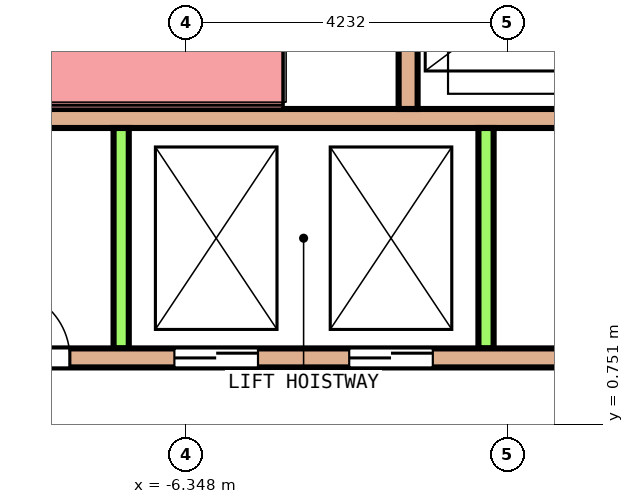
"""IFC4 building model, lengths in metres.
Left out: names, types, materials, properties, quantities, classifications, styles, units other than length and angle.
Written with IfcOpenShell. Run it as: python <this file> out.ifc"""

import sys

from ifc_helpers import new_model, si_unit, direction, frame, frame_2d, origin, place, context, subcontext, project, spatial, rectangle, extrude, element, fill, save


model = new_model("IFC4")
c1 = context("Model", 3, precision=1e-05, world=origin(), true_north=direction((0.0, 1.0)))
c2 = subcontext(c1, "Body", "Model", "MODEL_VIEW")
j1 = project(units=[si_unit("LENGTHUNIT", "METRE"), si_unit("PLANEANGLEUNIT", "RADIAN")], contexts=[c1])
p1 = place(None, origin())
s1 = spatial("IfcSite", under=j1, at=p1, CompositionType="ELEMENT")
p2 = place(p1, origin())
s2 = spatial("IfcBuilding", under=s1, at=p2, CompositionType="ELEMENT")
p3 = place(p2, frame((0.0, 0.0, 198.0)))
s3 = spatial("IfcBuildingStorey", under=s2, at=p3, CompositionType="ELEMENT", Elevation=198.0)
p4 = place(p3, frame((-9.35, 1.625, 0.0), z_axis=(0.0, 0.0, 1.0), x_axis=(1.0, 0.0, 0.0)))
e1 = element("IfcWall", 1, at=p4, inside=s3, PredefinedType="SOLIDWALL", context=c2, shape_type="SweptSolid", body=[
    extrude(rectangle(XDim=18.7, YDim=0.25, at=frame_2d((9.35, 0.0))), origin(), (0.0, 0.0, 1.0), 4.1),
])
p5 = place(p4, frame((2.85, 0.0, 0.0)))
e2 = element("IfcOpeningElement", 2, at=p5, cuts=e1, PredefinedType="OPENING", context=c2, shape_type="SweptSolid", body=[
    extrude(rectangle(XDim=1.1, YDim=2.1, at=frame_2d((0.55, 1.05))), frame((0.0, 0.135, 0.0), z_axis=(0.0, -1.0, 0.0), x_axis=(1.0, 0.0, 0.0)), (0.0, 0.0, 1.0), 0.27),
])
p6 = place(p4, frame((5.15, 0.0, 0.0)))
e3 = element("IfcOpeningElement", 3, at=p6, cuts=e1, PredefinedType="OPENING", context=c2, shape_type="SweptSolid", body=[
    extrude(rectangle(XDim=1.1, YDim=2.1, at=frame_2d((0.55, 1.05))), frame((0.0, 0.135, 0.0), z_axis=(0.0, -1.0, 0.0), x_axis=(1.0, 0.0, 0.0)), (0.0, 0.0, 1.0), 0.27),
])
p7 = place(p4, frame((14.8, 0.0, 0.0)))
e4 = element("IfcOpeningElement", 4, at=p7, cuts=e1, PredefinedType="OPENING", context=c2, shape_type="SweptSolid", body=[
    extrude(rectangle(XDim=1.1, YDim=2.1, at=frame_2d((0.55, 1.05))), frame((0.0, 0.135, 0.0), z_axis=(0.0, -1.0, 0.0), x_axis=(1.0, 0.0, 0.0)), (0.0, 0.0, 1.0), 0.27),
])
p8 = place(p4, frame((0.575, 0.0, 0.0)))
e5 = element("IfcOpeningElement", 5, at=p8, cuts=e1, PredefinedType="OPENING", context=c2, shape_type="SweptSolid", body=[
    extrude(rectangle(XDim=0.9, YDim=2.1, at=frame_2d((0.45, 1.05))), frame((0.0, 0.135, 0.0), z_axis=(0.0, -1.0, 0.0), x_axis=(1.0, 0.0, 0.0)), (0.0, 0.0, 1.0), 0.27),
])
p9 = place(p4, frame((17.225, 0.0, 0.0)))
e6 = element("IfcOpeningElement", 6, at=p9, cuts=e1, PredefinedType="OPENING", context=c2, shape_type="SweptSolid", body=[
    extrude(rectangle(XDim=0.9, YDim=2.1, at=frame_2d((0.45, 1.05))), frame((0.0, 0.135, 0.0), z_axis=(0.0, -1.0, 0.0), x_axis=(1.0, 0.0, 0.0)), (0.0, 0.0, 1.0), 0.27),
])
p10 = place(p3, frame((-9.35, 4.775, 0.0), z_axis=(0.0, 0.0, 1.0), x_axis=(1.0, 0.0, 0.0)))
e7 = element("IfcWall", 7, at=p10, inside=s3, PredefinedType="SOLIDWALL", context=c2, shape_type="SweptSolid", body=[
    extrude(rectangle(XDim=18.7, YDim=0.25, at=frame_2d((9.35, 0.0))), origin(), (0.0, 0.0, 1.0), 4.1),
])
for number, where, z_axis, x_axis in (
    (8, (-7.2, 1.75, 0.0), (0.0, 0.0, 1.0), (0.0, 1.0, 0.0)),
    (9, (-2.4, 1.75, 0.0), (0.0, 0.0, 1.0), (0.0, 1.0, 0.0)),
):
    element("IfcWall", number, at=place(p3, frame(where, z_axis=z_axis, x_axis=x_axis)), inside=s3, PredefinedType="SOLIDWALL", context=c2, shape_type="SweptSolid", body=[
        extrude(rectangle(XDim=2.9, YDim=0.2, at=frame_2d((1.45, 0.0))), origin(), (0.0, 0.0, 1.0), 4.1),
    ])
p11 = place(p3, frame((-3.425, 4.9, 0.0), z_axis=(0.0, 0.0, 1.0), x_axis=(0.0, 1.0, 0.0)))
e10 = element("IfcWall", 10, at=p11, inside=s3, PredefinedType="SOLIDWALL", context=c2, shape_type="SweptSolid", body=[
    extrude(rectangle(XDim=2.85, YDim=0.25, at=frame_2d((1.425, 0.0))), origin(), (0.0, 0.0, 1.0), 4.1),
])
p12 = place(p5, origin())
e11 = element("IfcDoor", 11, at=p12, inside=s3, OperationType="DOUBLE_DOOR_SLIDING", PredefinedType="DOOR", context=c2, shape_type="SweptSolid", body=[
    extrude(rectangle(XDim=1.1, YDim=2.1, at=frame_2d((0.55, 1.05))), frame((0.0, 0.075, 0.0), z_axis=(0.0, -1.0, 0.0), x_axis=(1.0, 0.0, 0.0)), (0.0, 0.0, 1.0), 0.15),
])
fill(e2, e11)
p13 = place(p6, origin())
e12 = element("IfcDoor", 12, at=p13, inside=s3, OperationType="DOUBLE_DOOR_SLIDING", PredefinedType="DOOR", context=c2, shape_type="SweptSolid", body=[
    extrude(rectangle(XDim=1.1, YDim=2.1, at=frame_2d((0.55, 1.05))), frame((0.0, 0.075, 0.0), z_axis=(0.0, -1.0, 0.0), x_axis=(1.0, 0.0, 0.0)), (0.0, 0.0, 1.0), 0.15),
])
fill(e3, e12)
p14 = place(p8, origin())
e13 = element("IfcDoor", 13, at=p14, inside=s3, OperationType="SINGLE_SWING_RIGHT", PredefinedType="DOOR", context=c2, shape_type="SweptSolid", body=[
    extrude(rectangle(XDim=0.9, YDim=2.1, at=frame_2d((0.45, 1.05))), frame((0.0, 0.075, 0.0), z_axis=(0.0, -1.0, 0.0), x_axis=(1.0, 0.0, 0.0)), (0.0, 0.0, 1.0), 0.15),
])
fill(e5, e13)
save(model, sys.argv[1])
